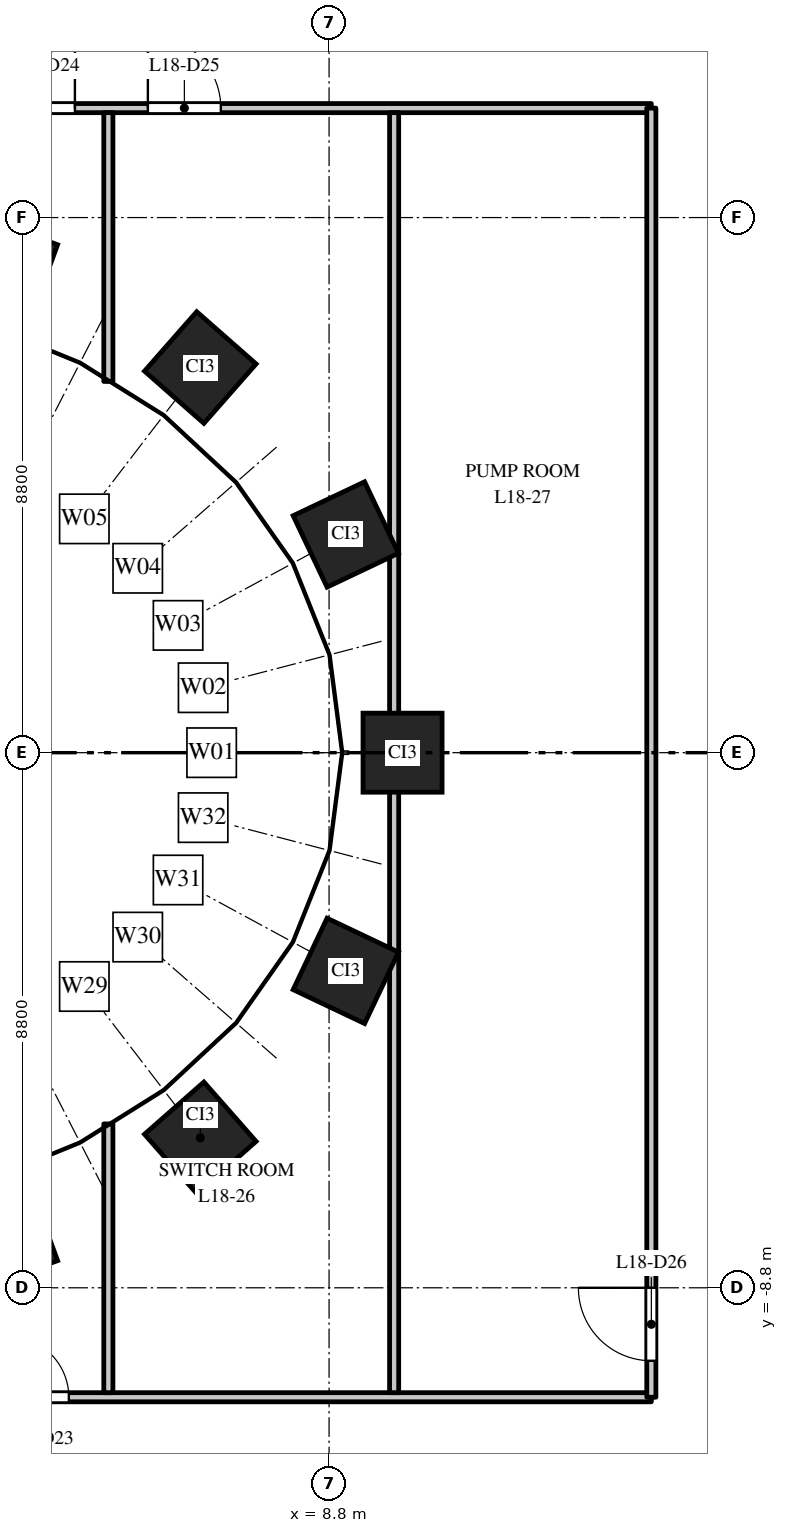
"""IFC4 building model, lengths in metres.
Left out: names, types, materials, properties, quantities, classifications, styles, units other than length and angle.
Written with IfcOpenShell. Run it as: python <this file> out.ifc"""

import sys

from ifc_helpers import new_model, si_unit, direction, frame, frame_2d, origin, origin_2d, place, context, subcontext, project, spatial, rectangle, extrude, element, fill, save


model = new_model("IFC4")
c1 = context("Model", 3, precision=1e-05, world=origin(), true_north=direction((0.0, 1.0)))
c2 = subcontext(c1, "Body", "Model", "MODEL_VIEW")
j1 = project(units=[si_unit("LENGTHUNIT", "METRE"), si_unit("PLANEANGLEUNIT", "RADIAN")], contexts=[c1])
p1 = place(None, origin())
s1 = spatial("IfcSite", under=j1, at=p1, CompositionType="ELEMENT")
p2 = place(p1, origin())
s2 = spatial("IfcBuilding", under=s1, at=p2, CompositionType="ELEMENT")
p3 = place(p2, frame((0.0, 0.0, 82.5)))
s3 = spatial("IfcBuildingStorey", under=s2, at=p3, CompositionType="ELEMENT", Elevation=82.5)
for number, where, z_axis, x_axis in (
    (1, (10.008, 0.0, 0.0), (0.0, 0.0, 1.0), (0.0, 1.0, 0.0)),
    (2, (9.076, 3.588, 0.0), (0.0, 0.0, 1.0), (-0.429, 0.903, 0.0)),
    (3, (6.682, 6.334, 0.0), (0.0, 0.0, 1.0), (-0.751, 0.66, 0.0)),
    (4, (3.501, 7.967, 0.0), (0.0, 0.0, 1.0), (-0.939, 0.344, 0.0)),
    (5, (3.501, -7.967, 0.0), (0.0, 0.0, 1.0), (0.939, 0.344, 0.0)),
    (6, (6.682, -6.334, 0.0), (0.0, 0.0, 1.0), (0.751, 0.66, 0.0)),
    (7, (9.076, -3.588, 0.0), (0.0, 0.0, 1.0), (0.429, 0.903, 0.0)),
):
    element("IfcColumn", number, at=place(p3, frame(where, z_axis=z_axis, x_axis=x_axis)), inside=s3, PredefinedType="COLUMN", context=c2, shape_type="SweptSolid", body=[
        extrude(rectangle(XDim=1.3, YDim=1.3, at=origin_2d()), origin(), (0.0, 0.0, 1.0), 5.5),
    ])
p4 = place(p3, frame((-14.1, -10.6, 0.0), z_axis=(0.0, 0.0, 1.0), x_axis=(1.0, 0.0, 0.0)))
e8 = element("IfcWall", 8, at=p4, inside=s3, PredefinedType="PARTITIONING", context=c2, shape_type="SweptSolid", body=[
    extrude(rectangle(XDim=28.2, YDim=0.15, at=frame_2d((14.1, 0.0))), origin(), (0.0, 0.0, 1.0), 4.35),
])
p5 = place(p4, frame((8.22, 0.0, 0.0)))
e9 = element("IfcOpeningElement", 9, at=p5, cuts=e8, PredefinedType="OPENING", context=c2, shape_type="SweptSolid", body=[
    extrude(rectangle(XDim=1.0, YDim=2.1, at=frame_2d((0.5, 1.05))), frame((0.0, 0.085, 0.0), z_axis=(0.0, -1.0, 0.0), x_axis=(1.0, 0.0, 0.0)), (0.0, 0.0, 1.0), 0.17),
])
p6 = place(p4, frame((12.92, 0.0, 0.0)))
e10 = element("IfcOpeningElement", 10, at=p6, cuts=e8, PredefinedType="OPENING", context=c2, shape_type="SweptSolid", body=[
    extrude(rectangle(XDim=1.0, YDim=2.1, at=frame_2d((0.5, 1.05))), frame((0.0, 0.085, 0.0), z_axis=(0.0, -1.0, 0.0), x_axis=(1.0, 0.0, 0.0)), (0.0, 0.0, 1.0), 0.17),
])
p7 = place(p4, frame((17.62, 0.0, 0.0)))
e11 = element("IfcOpeningElement", 11, at=p7, cuts=e8, PredefinedType="OPENING", context=c2, shape_type="SweptSolid", body=[
    extrude(rectangle(XDim=1.0, YDim=2.1, at=frame_2d((0.5, 1.05))), frame((0.0, 0.085, 0.0), z_axis=(0.0, -1.0, 0.0), x_axis=(1.0, 0.0, 0.0)), (0.0, 0.0, 1.0), 0.17),
])
p8 = place(p3, frame((-14.1, 10.6, 0.0), z_axis=(0.0, 0.0, 1.0), x_axis=(1.0, 0.0, 0.0)))
e12 = element("IfcWall", 12, at=p8, inside=s3, PredefinedType="PARTITIONING", context=c2, shape_type="SweptSolid", body=[
    extrude(rectangle(XDim=28.2, YDim=0.15, at=frame_2d((14.1, 0.0))), origin(), (0.0, 0.0, 1.0), 4.35),
])
p9 = place(p8, frame((8.32, 0.0, 0.0)))
e13 = element("IfcOpeningElement", 13, at=p9, cuts=e12, PredefinedType="OPENING", context=c2, shape_type="SweptSolid", body=[
    extrude(rectangle(XDim=1.0, YDim=2.1, at=frame_2d((0.5, 1.05))), frame((0.0, 0.085, 0.0), z_axis=(0.0, -1.0, 0.0), x_axis=(1.0, 0.0, 0.0)), (0.0, 0.0, 1.0), 0.17),
])
p10 = place(p8, frame((13.02, 0.0, 0.0)))
e14 = element("IfcOpeningElement", 14, at=p10, cuts=e12, PredefinedType="OPENING", context=c2, shape_type="SweptSolid", body=[
    extrude(rectangle(XDim=1.0, YDim=2.1, at=frame_2d((0.5, 1.05))), frame((0.0, 0.085, 0.0), z_axis=(0.0, -1.0, 0.0), x_axis=(1.0, 0.0, 0.0)), (0.0, 0.0, 1.0), 0.17),
])
p11 = place(p8, frame((17.72, 0.0, 0.0)))
e15 = element("IfcOpeningElement", 15, at=p11, cuts=e12, PredefinedType="OPENING", context=c2, shape_type="SweptSolid", body=[
    extrude(rectangle(XDim=1.0, YDim=2.1, at=frame_2d((0.5, 1.05))), frame((0.0, 0.085, 0.0), z_axis=(0.0, -1.0, 0.0), x_axis=(1.0, 0.0, 0.0)), (0.0, 0.0, 1.0), 0.17),
])
p12 = place(p8, frame((19.92, 0.0, 0.0)))
e16 = element("IfcOpeningElement", 16, at=p12, cuts=e12, PredefinedType="OPENING", context=c2, shape_type="SweptSolid", body=[
    extrude(rectangle(XDim=1.2, YDim=2.1, at=frame_2d((0.6, 1.05))), frame((0.0, 0.085, 0.0), z_axis=(0.0, -1.0, 0.0), x_axis=(1.0, 0.0, 0.0)), (0.0, 0.0, 1.0), 0.17),
])
for number, where, z_axis, x_axis in (
    (17, (5.17, -10.525, 0.0), (0.0, 0.0, 1.0), (0.0, 1.0, 0.0)),
    (18, (5.17, 6.105, 0.0), (0.0, 0.0, 1.0), (0.0, 1.0, 0.0)),
):
    element("IfcWall", number, at=place(p3, frame(where, z_axis=z_axis, x_axis=x_axis)), inside=s3, PredefinedType="PARTITIONING", context=c2, shape_type="SweptSolid", body=[
        extrude(rectangle(XDim=4.42, YDim=0.15, at=frame_2d((2.21, 0.0))), origin(), (0.0, 0.0, 1.0), 4.35),
    ])
p13 = place(p3, frame((9.87, -10.525, 0.0), z_axis=(0.0, 0.0, 1.0), x_axis=(0.0, 1.0, 0.0)))
e19 = element("IfcWall", 19, at=p13, inside=s3, PredefinedType="PARTITIONING", context=c2, shape_type="SweptSolid", body=[
    extrude(rectangle(XDim=21.05, YDim=0.15, at=frame_2d((10.525, 0.0))), origin(), (0.0, 0.0, 1.0), 4.25),
])
p14 = place(p3, frame((14.1, -10.6, 0.0), z_axis=(0.0, 0.0, 1.0), x_axis=(0.0, 1.0, 0.0)))
e20 = element("IfcWall", 20, at=p14, inside=s3, PredefinedType="PARTITIONING", context=c2, shape_type="SweptSolid", body=[
    extrude(rectangle(XDim=21.2, YDim=0.15, at=frame_2d((10.6, 0.0))), origin(), (0.0, 0.0, 1.0), 4.25),
])
p15 = place(p14, frame((0.6, 0.0, 0.0)))
e21 = element("IfcOpeningElement", 21, at=p15, cuts=e20, PredefinedType="OPENING", context=c2, shape_type="SweptSolid", body=[
    extrude(rectangle(XDim=1.2, YDim=2.1, at=frame_2d((0.6, 1.05))), frame((0.0, 0.085, 0.0), z_axis=(0.0, -1.0, 0.0), x_axis=(1.0, 0.0, 0.0)), (0.0, 0.0, 1.0), 0.17),
])
p16 = place(p7, origin())
e22 = element("IfcDoor", 22, at=p16, inside=s3, OperationType="SINGLE_SWING_LEFT", PredefinedType="DOOR", context=c2, shape_type="SweptSolid", body=[
    extrude(rectangle(XDim=1.0, YDim=2.1, at=frame_2d((0.5, 1.05))), frame((0.0, 0.025, 0.0), z_axis=(0.0, -1.0, 0.0), x_axis=(1.0, 0.0, 0.0)), (0.0, 0.0, 1.0), 0.05),
])
fill(e11, e22)
p17 = place(p11, origin())
e23 = element("IfcDoor", 23, at=p17, inside=s3, OperationType="SINGLE_SWING_RIGHT", PredefinedType="DOOR", context=c2, shape_type="SweptSolid", body=[
    extrude(rectangle(XDim=1.0, YDim=2.1, at=frame_2d((0.5, 1.05))), frame((0.0, 0.025, 0.0), z_axis=(0.0, -1.0, 0.0), x_axis=(1.0, 0.0, 0.0)), (0.0, 0.0, 1.0), 0.05),
])
fill(e15, e23)
p18 = place(p12, origin())
e24 = element("IfcDoor", 24, at=p18, inside=s3, OperationType="SINGLE_SWING_LEFT", PredefinedType="DOOR", context=c2, shape_type="SweptSolid", body=[
    extrude(rectangle(XDim=1.2, YDim=2.1, at=frame_2d((0.6, 1.05))), frame((0.0, 0.025, 0.0), z_axis=(0.0, -1.0, 0.0), x_axis=(1.0, 0.0, 0.0)), (0.0, 0.0, 1.0), 0.05),
])
fill(e16, e24)
p19 = place(p15, origin())
e25 = element("IfcDoor", 25, at=p19, inside=s3, OperationType="SINGLE_SWING_RIGHT", PredefinedType="DOOR", context=c2, shape_type="SweptSolid", body=[
    extrude(rectangle(XDim=1.2, YDim=2.1, at=frame_2d((0.6, 1.05))), frame((0.0, 0.025, 0.0), z_axis=(0.0, -1.0, 0.0), x_axis=(1.0, 0.0, 0.0)), (0.0, 0.0, 1.0), 0.05),
])
fill(e21, e25)
save(model, sys.argv[1])
